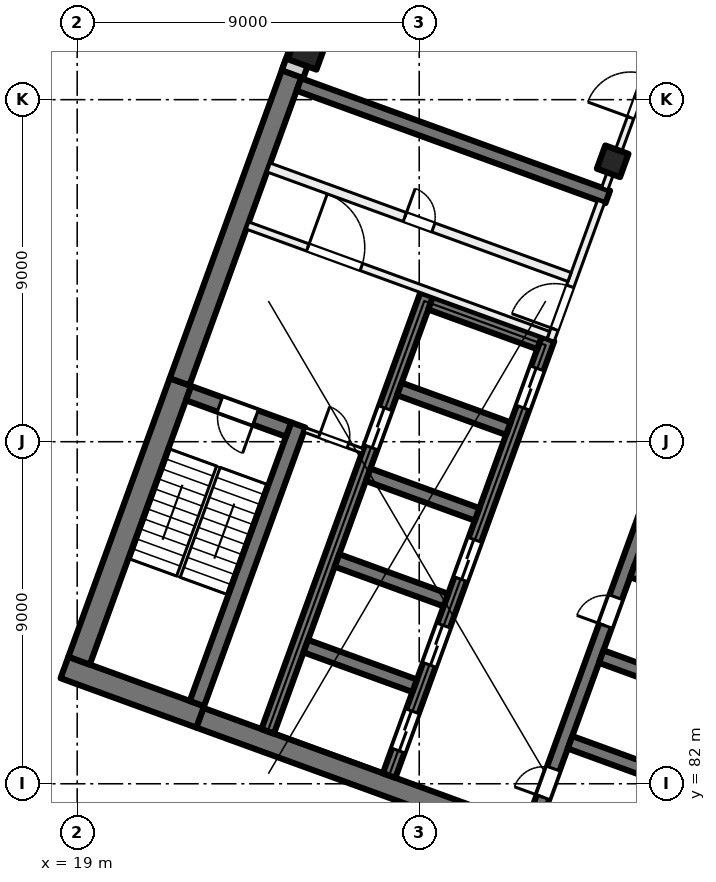
"""IFC4 building model, lengths in metres.
Left out: names, types, materials, properties, quantities, classifications, styles, units other than length and angle.
Written with IfcOpenShell. Run it as: python <this file> out.ifc"""

import sys

from ifc_helpers import new_model, si_unit, direction, frame, frame_2d, origin, origin_2d, place, context, subcontext, project, spatial, rectangle, extrude, element, fill, save


model = new_model("IFC4")
c1 = context("Model", 3, precision=1e-05, world=origin(), true_north=direction((0.0, 1.0)))
c2 = subcontext(c1, "Body", "Model", "MODEL_VIEW")
j1 = project(units=[si_unit("LENGTHUNIT", "METRE"), si_unit("PLANEANGLEUNIT", "RADIAN")], contexts=[c1])
p1 = place(None, origin())
s1 = spatial("IfcSite", under=j1, at=p1, CompositionType="ELEMENT")
p2 = place(p1, origin())
s2 = spatial("IfcBuilding", under=s1, at=p2, CompositionType="ELEMENT")
p3 = place(p2, frame((0.0, 0.0, 138.5)))
s3 = spatial("IfcBuildingStorey", under=s2, at=p3, CompositionType="ELEMENT", Elevation=138.5)
p4 = place(p3, frame((33.091, 98.379, 0.0), z_axis=(0.0, 0.0, 1.0), x_axis=(-0.342020143326, -0.939692620786, 0.0)))
e1 = element("IfcColumn", 1, at=p4, inside=s3, PredefinedType="COLUMN", context=c2, shape_type="SweptSolid", body=[
    extrude(rectangle(XDim=0.65, YDim=0.65, at=origin_2d()), origin(), (0.0, 0.0, 1.0), 4.0),
])
p5 = place(p3, frame((25.056, 101.303, 0.0), z_axis=(0.0, 0.0, 1.0), x_axis=(-0.342020143326, -0.939692620786, 0.0)))
e2 = element("IfcColumn", 2, at=p5, inside=s3, PredefinedType="COLUMN", context=c2, shape_type="SweptSolid", body=[
    extrude(rectangle(XDim=0.8, YDim=0.8, at=origin_2d()), origin(), (0.0, 0.0, 1.0), 4.0),
])
p6 = place(p3, frame((35.759, 78.811, 0.0), z_axis=(0.0, 0.0, 1.0), x_axis=(-0.939692894512, 0.342019391267, 0.0)))
e3 = element("IfcWall", 3, at=p6, inside=s3, PredefinedType="SHEAR", context=c2, shape_type="SweptSolid", body=[
    extrude(rectangle(XDim=14.4, YDim=0.55, at=frame_2d((7.2, 0.0))), origin(), (0.0, 0.0, 1.0), 4.0),
])
p7 = place(p3, frame((22.236, 83.76, 0.0), z_axis=(0.0, 0.0, 1.0), x_axis=(-0.939680822529, 0.342052557032, 0.0)))
e4 = element("IfcWall", 4, at=p7, inside=s3, PredefinedType="SHEAR", context=c2, shape_type="SweptSolid", body=[
    extrude(rectangle(XDim=3.8, YDim=0.6, at=frame_2d((1.9, 0.0))), origin(), (0.0, 0.0, 1.0), 4.0),
])
p8 = place(p3, frame((19.05, 85.239, 0.0), z_axis=(0.0, 0.0, 1.0), x_axis=(0.342016982193, 0.939693771338, 0.0)))
e5 = element("IfcWall", 5, at=p8, inside=s3, PredefinedType="SHEAR", context=c2, shape_type="SweptSolid", body=[
    extrude(rectangle(XDim=7.8, YDim=0.6, at=frame_2d((3.9, 0.0))), origin(), (0.0, 0.0, 1.0), 4.0),
])
p9 = place(p3, frame((21.694, 92.577, 0.0), z_axis=(0.0, 0.0, 1.0), x_axis=(0.342010253184, 0.939696220444, 0.0)))
e6 = element("IfcWall", 6, at=p9, inside=s3, PredefinedType="SHEAR", context=c2, shape_type="SweptSolid", body=[
    extrude(rectangle(XDim=8.95, YDim=0.55, at=frame_2d((4.475, 0.0))), origin(), (0.0, 0.0, 1.0), 4.0),
])
p10 = place(p3, frame((22.15, 84.11, 0.0), z_axis=(0.0, 0.0, 1.0), x_axis=(0.342016982193, 0.939693771338, 0.0)))
e7 = element("IfcWall", 7, at=p10, inside=s3, PredefinedType="SHEAR", context=c2, shape_type="SweptSolid", body=[
    extrude(rectangle(XDim=7.8, YDim=0.4, at=frame_2d((3.9, 0.0))), origin(), (0.0, 0.0, 1.0), 4.0),
])
p11 = place(p3, frame((24.562, 91.32, 0.0), z_axis=(0.0, 0.0, 1.0), x_axis=(-0.939717030584, 0.341953070509, 0.0)))
e8 = element("IfcWall", 8, at=p11, inside=s3, PredefinedType="SHEAR", context=c2, shape_type="SweptSolid", body=[
    extrude(rectangle(XDim=2.8, YDim=0.4, at=frame_2d((1.4, 0.0))), origin(), (0.0, 0.0, 1.0), 4.0),
])
p12 = place(p11, frame((0.925, 0.0, 0.0)))
e9 = element("IfcOpeningElement", 9, at=p12, cuts=e8, PredefinedType="OPENING", context=c2, shape_type="SweptSolid", body=[
    extrude(rectangle(XDim=1.0, YDim=2.1, at=frame_2d((0.5, 1.05))), frame((0.0, 0.21, 0.0), z_axis=(0.0, -1.0, 0.0), x_axis=(1.0, 0.0, 0.0)), (0.0, 0.0, 1.0), 0.42),
])
p13 = place(p3, frame((30.967, 80.848, 0.0), z_axis=(0.0, 0.0, 1.0), x_axis=(0.34201563943, 0.939694260058, 0.0)))
e10 = element("IfcWall", 10, at=p13, inside=s3, PredefinedType="SHEAR", context=c2, shape_type="SweptSolid", body=[
    extrude(rectangle(XDim=12.225, YDim=0.35, at=frame_2d((6.113, 0.0))), origin(), (0.0, 0.0, 1.0), 4.0),
])
p14 = place(p13, frame((0.85, 0.0, 0.0)))
e11 = element("IfcOpeningElement", 11, at=p14, cuts=e10, PredefinedType="OPENING", context=c2, shape_type="SweptSolid", body=[
    extrude(rectangle(XDim=0.8, YDim=2.1, at=frame_2d((0.4, 1.05))), frame((0.0, 0.185, 0.0), z_axis=(0.0, -1.0, 0.0), x_axis=(1.0, 0.0, 0.0)), (0.0, 0.0, 1.0), 0.37),
])
p15 = place(p13, frame((5.65, 0.0, 0.0)))
e12 = element("IfcOpeningElement", 12, at=p15, cuts=e10, PredefinedType="OPENING", context=c2, shape_type="SweptSolid", body=[
    extrude(rectangle(XDim=0.8, YDim=2.1, at=frame_2d((0.4, 1.05))), frame((0.0, 0.185, 0.0), z_axis=(0.0, -1.0, 0.0), x_axis=(1.0, 0.0, 0.0)), (0.0, 0.0, 1.0), 0.37),
])
p16 = place(p3, frame((34.835, 82.047, 0.0), z_axis=(0.0, 0.0, 1.0), x_axis=(-0.939683528043, 0.3420451244, 0.0)))
e13 = element("IfcWall", 13, at=p16, inside=s3, PredefinedType="SHEAR", context=c2, shape_type="SweptSolid", body=[
    extrude(rectangle(XDim=3.05, YDim=0.35, at=frame_2d((1.525, 0.0))), origin(), (0.0, 0.0, 1.0), 4.0),
])
p17 = place(p3, frame((35.656, 84.303, 0.0), z_axis=(0.0, 0.0, 1.0), x_axis=(-0.939709254651, 0.341974438698, 0.0)))
e14 = element("IfcWall", 14, at=p17, inside=s3, PredefinedType="SHEAR", context=c2, shape_type="SweptSolid", body=[
    extrude(rectangle(XDim=3.05, YDim=0.35, at=frame_2d((1.525, 0.0))), origin(), (0.0, 0.0, 1.0), 4.0),
])
p18 = place(p3, frame((36.477, 86.558, 0.0), z_axis=(0.0, 0.0, 1.0), x_axis=(-0.939683528043, 0.3420451244, 0.0)))
e15 = element("IfcWall", 15, at=p18, inside=s3, PredefinedType="SHEAR", context=c2, shape_type="SweptSolid", body=[
    extrude(rectangle(XDim=3.05, YDim=0.35, at=frame_2d((1.525, 0.0))), origin(), (0.0, 0.0, 1.0), 4.0),
])
p19 = place(p3, frame((27.208, 82.216, 0.0), z_axis=(0.0, 0.0, 1.0), x_axis=(0.34201563943, 0.939694260058, 0.0)))
e16 = element("IfcWall", 16, at=p19, inside=s3, PredefinedType="SHEAR", context=c2, shape_type="SweptSolid", body=[
    extrude(rectangle(XDim=12.225, YDim=0.35, at=frame_2d((6.113, 0.0))), origin(), (0.0, 0.0, 1.0), 4.0),
])
p20 = place(p19, frame((0.7, 0.0, 0.0)))
e17 = element("IfcOpeningElement", 17, at=p20, cuts=e16, PredefinedType="OPENING", context=c2, shape_type="SweptSolid", body=[
    extrude(rectangle(XDim=1.1, YDim=2.1, at=frame_2d((0.55, 1.05))), frame((0.0, 0.185, 0.0), z_axis=(0.0, -1.0, 0.0), x_axis=(1.0, 0.0, 0.0)), (0.0, 0.0, 1.0), 0.37),
])
p21 = place(p19, frame((3.1, 0.0, 0.0)))
e18 = element("IfcOpeningElement", 18, at=p21, cuts=e16, PredefinedType="OPENING", context=c2, shape_type="SweptSolid", body=[
    extrude(rectangle(XDim=1.1, YDim=2.1, at=frame_2d((0.55, 1.05))), frame((0.0, 0.185, 0.0), z_axis=(0.0, -1.0, 0.0), x_axis=(1.0, 0.0, 0.0)), (0.0, 0.0, 1.0), 0.37),
])
p22 = place(p19, frame((5.5, 0.0, 0.0)))
e19 = element("IfcOpeningElement", 19, at=p22, cuts=e16, PredefinedType="OPENING", context=c2, shape_type="SweptSolid", body=[
    extrude(rectangle(XDim=1.1, YDim=2.1, at=frame_2d((0.55, 1.05))), frame((0.0, 0.185, 0.0), z_axis=(0.0, -1.0, 0.0), x_axis=(1.0, 0.0, 0.0)), (0.0, 0.0, 1.0), 0.37),
])
p23 = place(p19, frame((10.3, 0.0, 0.0)))
e20 = element("IfcOpeningElement", 20, at=p23, cuts=e16, PredefinedType="OPENING", context=c2, shape_type="SweptSolid", body=[
    extrude(rectangle(XDim=1.1, YDim=2.1, at=frame_2d((0.55, 1.05))), frame((0.0, 0.185, 0.0), z_axis=(0.0, -1.0, 0.0), x_axis=(1.0, 0.0, 0.0)), (0.0, 0.0, 1.0), 0.37),
])
p24 = place(p3, frame((24.013, 83.379, 0.0), z_axis=(0.0, 0.0, 1.0), x_axis=(0.34201563943, 0.939694260058, 0.0)))
e21 = element("IfcWall", 21, at=p24, inside=s3, PredefinedType="SHEAR", context=c2, shape_type="SweptSolid", body=[
    extrude(rectangle(XDim=12.225, YDim=0.35, at=frame_2d((6.113, 0.0))), origin(), (0.0, 0.0, 1.0), 4.0),
])
p25 = place(p24, frame((7.95, 0.0, 0.0)))
e22 = element("IfcOpeningElement", 22, at=p25, cuts=e21, PredefinedType="OPENING", context=c2, shape_type="SweptSolid", body=[
    extrude(rectangle(XDim=1.1, YDim=2.1, at=frame_2d((0.55, 1.05))), frame((0.0, 0.185, 0.0), z_axis=(0.0, -1.0, 0.0), x_axis=(1.0, 0.0, 0.0)), (0.0, 0.0, 1.0), 0.37),
])
for number, where, z_axis, x_axis in (
    (23, (27.881, 84.578, 0.0), (0.0, 0.0, 1.0), (-0.94, 0.342, 0.0)),
    (24, (28.702, 86.833, 0.0), (0.0, 0.0, 1.0), (-0.94, 0.342, 0.0)),
    (25, (29.523, 89.089, 0.0), (0.0, 0.0, 1.0), (-0.94, 0.342, 0.0)),
):
    element("IfcWall", number, at=place(p3, frame(where, z_axis=z_axis, x_axis=x_axis)), inside=s3, PredefinedType="SHEAR", context=c2, shape_type="SweptSolid", body=[
        extrude(rectangle(XDim=3.05, YDim=0.35, at=frame_2d((1.525, 0.0))), origin(), (0.0, 0.0, 1.0), 4.0),
    ])
p26 = place(p3, frame((30.344, 91.344, 0.0), z_axis=(0.0, 0.0, 1.0), x_axis=(-0.939709254651, 0.341974438698, 0.0)))
e26 = element("IfcWall", 26, at=p26, inside=s3, PredefinedType="SHEAR", context=c2, shape_type="SweptSolid", body=[
    extrude(rectangle(XDim=3.05, YDim=0.35, at=frame_2d((1.525, 0.0))), origin(), (0.0, 0.0, 1.0), 4.0),
])
p27 = place(p3, frame((31.165, 93.599, 0.0), z_axis=(0.0, 0.0, 1.0), x_axis=(-0.939683528043, 0.3420451244, 0.0)))
e27 = element("IfcWall", 27, at=p27, inside=s3, PredefinedType="SHEAR", context=c2, shape_type="SweptSolid", body=[
    extrude(rectangle(XDim=3.05, YDim=0.35, at=frame_2d((1.525, 0.0))), origin(), (0.0, 0.0, 1.0), 4.0),
])
p28 = place(p3, frame((32.962, 97.441, 0.0), z_axis=(0.0, 0.0, 1.0), x_axis=(-0.939689545667, 0.342028592028, 0.0)))
e28 = element("IfcWall", 28, at=p28, inside=s3, PredefinedType="SHEAR", context=c2, shape_type="SweptSolid", body=[
    extrude(rectangle(XDim=8.65, YDim=0.35, at=frame_2d((4.325, 0.0))), origin(), (0.0, 0.0, 1.0), 4.0),
])
p29 = place(p3, frame((24.666, 100.669, 0.0), z_axis=(0.0, 0.0, 1.0), x_axis=(0.34201964167, 0.939692803373, 0.0)))
e29 = element("IfcWall", 29, at=p29, inside=s3, PredefinedType="SOLIDWALL", context=c2, shape_type="SweptSolid", body=[
    extrude(rectangle(XDim=32.884, YDim=0.6, at=frame_2d((16.442, 0.0))), origin(), (0.0, 0.0, 1.0), 3.625),
])
p30 = place(p29, frame((1.48, 0.0, 0.9)))
e30 = element("IfcOpeningElement", 30, at=p30, cuts=e29, PredefinedType="OPENING", context=c2, shape_type="SweptSolid", body=[
    extrude(rectangle(XDim=3.0, YDim=2.4, at=frame_2d((1.5, 1.2))), frame((0.0, 0.31, 0.0), z_axis=(0.0, -1.0, 0.0), x_axis=(1.0, 0.0, 0.0)), (0.0, 0.0, 1.0), 0.62),
])
p31 = place(p29, frame((5.98, 0.0, 0.9)))
e31 = element("IfcOpeningElement", 31, at=p31, cuts=e29, PredefinedType="OPENING", context=c2, shape_type="SweptSolid", body=[
    extrude(rectangle(XDim=3.0, YDim=2.4, at=frame_2d((1.5, 1.2))), frame((0.0, 0.31, 0.0), z_axis=(0.0, -1.0, 0.0), x_axis=(1.0, 0.0, 0.0)), (0.0, 0.0, 1.0), 0.62),
])
p32 = place(p29, frame((10.48, 0.0, 0.9)))
e32 = element("IfcOpeningElement", 32, at=p32, cuts=e29, PredefinedType="OPENING", context=c2, shape_type="SweptSolid", body=[
    extrude(rectangle(XDim=3.0, YDim=2.4, at=frame_2d((1.5, 1.2))), frame((0.0, 0.31, 0.0), z_axis=(0.0, -1.0, 0.0), x_axis=(1.0, 0.0, 0.0)), (0.0, 0.0, 1.0), 0.62),
])
p33 = place(p29, frame((14.98, 0.0, 0.9)))
e33 = element("IfcOpeningElement", 33, at=p33, cuts=e29, PredefinedType="OPENING", context=c2, shape_type="SweptSolid", body=[
    extrude(rectangle(XDim=3.0, YDim=2.4, at=frame_2d((1.5, 1.2))), frame((0.0, 0.31, 0.0), z_axis=(0.0, -1.0, 0.0), x_axis=(1.0, 0.0, 0.0)), (0.0, 0.0, 1.0), 0.62),
])
p34 = place(p29, frame((19.48, 0.0, 0.9)))
e34 = element("IfcOpeningElement", 34, at=p34, cuts=e29, PredefinedType="OPENING", context=c2, shape_type="SweptSolid", body=[
    extrude(rectangle(XDim=3.0, YDim=2.4, at=frame_2d((1.5, 1.2))), frame((0.0, 0.31, 0.0), z_axis=(0.0, -1.0, 0.0), x_axis=(1.0, 0.0, 0.0)), (0.0, 0.0, 1.0), 0.62),
])
p35 = place(p29, frame((23.98, 0.0, 0.9)))
e35 = element("IfcOpeningElement", 35, at=p35, cuts=e29, PredefinedType="OPENING", context=c2, shape_type="SweptSolid", body=[
    extrude(rectangle(XDim=3.0, YDim=2.4, at=frame_2d((1.5, 1.2))), frame((0.0, 0.31, 0.0), z_axis=(0.0, -1.0, 0.0), x_axis=(1.0, 0.0, 0.0)), (0.0, 0.0, 1.0), 0.62),
])
p36 = place(p29, frame((28.48, 0.0, 0.9)))
e36 = element("IfcOpeningElement", 36, at=p36, cuts=e29, PredefinedType="OPENING", context=c2, shape_type="SweptSolid", body=[
    extrude(rectangle(XDim=3.0, YDim=2.4, at=frame_2d((1.5, 1.2))), frame((0.0, 0.31, 0.0), z_axis=(0.0, -1.0, 0.0), x_axis=(1.0, 0.0, 0.0)), (0.0, 0.0, 1.0), 0.62),
])
p37 = place(p3, frame((31.459, 93.678, 0.0), z_axis=(0.0, 0.0, 1.0), x_axis=(0.341985870128, 0.939705094502, 0.0)))
e37 = element("IfcWall", 37, at=p37, inside=s3, PredefinedType="PARTITIONING", context=c2, shape_type="SweptSolid", body=[
    extrude(rectangle(XDim=3.875, YDim=0.2, at=frame_2d((1.938, 0.0))), origin(), (0.0, 0.0, 1.0), 3.625),
])
p38 = place(p37, frame((0.3, 0.0, 0.0)))
e38 = element("IfcOpeningElement", 38, at=p38, cuts=e37, PredefinedType="OPENING", context=c2, shape_type="SweptSolid", body=[
    extrude(rectangle(XDim=1.2, YDim=2.1, at=frame_2d((0.6, 1.05))), frame((0.0, 0.11, 0.0), z_axis=(0.0, -1.0, 0.0), x_axis=(1.0, 0.0, 0.0)), (0.0, 0.0, 1.0), 0.22),
])
p39 = place(p3, frame((23.483, 96.688, 0.0), z_axis=(0.0, 0.0, 1.0), x_axis=(0.939691007314, -0.342024576271, 0.0)))
e39 = element("IfcWall", 39, at=p39, inside=s3, PredefinedType="PARTITIONING", context=c2, shape_type="SweptSolid", body=[
    extrude(rectangle(XDim=8.425, YDim=0.2, at=frame_2d((4.212, 0.0))), origin(), (0.0, 0.0, 1.0), 3.625),
])
p40 = place(p39, frame((1.688, 0.0, 0.0)))
e40 = element("IfcOpeningElement", 40, at=p40, cuts=e39, PredefinedType="OPENING", context=c2, shape_type="SweptSolid", body=[
    extrude(rectangle(XDim=1.5, YDim=2.1, at=frame_2d((0.75, 1.05))), frame((0.0, 0.11, 0.0), z_axis=(0.0, -1.0, 0.0), x_axis=(1.0, 0.0, 0.0)), (0.0, 0.0, 1.0), 0.22),
])
p41 = place(p3, frame((24.039, 98.215, 0.0), z_axis=(0.0, 0.0, 1.0), x_axis=(0.939687617333, -0.342033889887, 0.0)))
e41 = element("IfcWall", 41, at=p41, inside=s3, PredefinedType="PARTITIONING", context=c2, shape_type="SweptSolid", body=[
    extrude(rectangle(XDim=8.425, YDim=0.25, at=frame_2d((4.212, 0.0))), origin(), (0.0, 0.0, 1.0), 3.625),
])
p42 = place(p41, frame((3.812, 0.0, 0.0)))
e42 = element("IfcOpeningElement", 42, at=p42, cuts=e41, PredefinedType="OPENING", context=c2, shape_type="SweptSolid", body=[
    extrude(rectangle(XDim=0.8, YDim=2.1, at=frame_2d((0.4, 1.05))), frame((0.0, 0.135, 0.0), z_axis=(0.0, -1.0, 0.0), x_axis=(1.0, 0.0, 0.0)), (0.0, 0.0, 1.0), 0.27),
])
p43 = place(p3, frame((24.985, 91.312, 0.0), z_axis=(0.0, 0.0, 1.0), x_axis=(0.939705651352, -0.341984340019, 0.0)))
e43 = element("IfcWall", 43, at=p43, inside=s3, PredefinedType="PARTITIONING", context=c2, shape_type="SweptSolid", body=[
    extrude(rectangle(XDim=1.625, YDim=0.125, at=frame_2d((0.812, 0.0))), origin(), (0.0, 0.0, 1.0), 3.625),
])
p44 = place(p43, frame((0.413, 0.0, 0.0)))
e44 = element("IfcOpeningElement", 44, at=p44, cuts=e43, PredefinedType="OPENING", context=c2, shape_type="SweptSolid", body=[
    extrude(rectangle(XDim=0.8, YDim=2.1, at=frame_2d((0.4, 1.05))), frame((0.0, 0.073, 0.0), z_axis=(0.0, -1.0, 0.0), x_axis=(1.0, 0.0, 0.0)), (0.0, 0.0, 1.0), 0.145),
])
p45 = place(p3, frame((32.881, 97.657, 0.0), z_axis=(0.0, 0.0, 1.0), x_axis=(0.342058204353, 0.939678766832, 0.0)))
e45 = element("IfcWall", 45, at=p45, inside=s3, PredefinedType="PARTITIONING", context=c2, shape_type="SweptSolid", body=[
    extrude(rectangle(XDim=5.163, YDim=0.175, at=frame_2d((2.581, 0.0))), origin(), (0.0, 0.0, 1.0), 3.625),
])
p46 = place(p45, frame((1.991, 0.0, 0.0)))
e46 = element("IfcOpeningElement", 46, at=p46, cuts=e45, PredefinedType="OPENING", context=c2, shape_type="SweptSolid", body=[
    extrude(rectangle(XDim=1.2, YDim=2.1, at=frame_2d((0.6, 1.05))), frame((0.0, 0.097, 0.0), z_axis=(0.0, -1.0, 0.0), x_axis=(1.0, 0.0, 0.0)), (0.0, 0.0, 1.0), 0.195),
])
p47 = place(p20, origin())
e47 = element("IfcDoor", 47, at=p47, inside=s3, OperationType="DOUBLE_DOOR_SLIDING", PredefinedType="DOOR", context=c2, shape_type="SweptSolid", body=[
    extrude(rectangle(XDim=1.1, YDim=2.1, at=frame_2d((0.55, 1.05))), frame((0.0, 0.025, 0.0), z_axis=(0.0, -1.0, 0.0), x_axis=(1.0, 0.0, 0.0)), (0.0, 0.0, 1.0), 0.05),
])
fill(e17, e47)
p48 = place(p21, origin())
e48 = element("IfcDoor", 48, at=p48, inside=s3, OperationType="DOUBLE_DOOR_SLIDING", PredefinedType="DOOR", context=c2, shape_type="SweptSolid", body=[
    extrude(rectangle(XDim=1.1, YDim=2.1, at=frame_2d((0.55, 1.05))), frame((0.0, 0.025, 0.0), z_axis=(0.0, -1.0, 0.0), x_axis=(1.0, 0.0, 0.0)), (0.0, 0.0, 1.0), 0.05),
])
fill(e18, e48)
p49 = place(p22, origin())
e49 = element("IfcDoor", 49, at=p49, inside=s3, OperationType="DOUBLE_DOOR_SLIDING", PredefinedType="DOOR", context=c2, shape_type="SweptSolid", body=[
    extrude(rectangle(XDim=1.1, YDim=2.1, at=frame_2d((0.55, 1.05))), frame((0.0, 0.025, 0.0), z_axis=(0.0, -1.0, 0.0), x_axis=(1.0, 0.0, 0.0)), (0.0, 0.0, 1.0), 0.05),
])
fill(e19, e49)
p50 = place(p23, origin())
e50 = element("IfcDoor", 50, at=p50, inside=s3, OperationType="DOUBLE_DOOR_SLIDING", PredefinedType="DOOR", context=c2, shape_type="SweptSolid", body=[
    extrude(rectangle(XDim=1.1, YDim=2.1, at=frame_2d((0.55, 1.05))), frame((0.0, 0.025, 0.0), z_axis=(0.0, -1.0, 0.0), x_axis=(1.0, 0.0, 0.0)), (0.0, 0.0, 1.0), 0.05),
])
fill(e20, e50)
p51 = place(p14, origin())
e51 = element("IfcDoor", 51, at=p51, inside=s3, OperationType="SINGLE_SWING_LEFT", PredefinedType="DOOR", context=c2, shape_type="SweptSolid", body=[
    extrude(rectangle(XDim=0.8, YDim=2.1, at=frame_2d((0.4, 1.05))), frame((0.0, 0.025, 0.0), z_axis=(0.0, -1.0, 0.0), x_axis=(1.0, 0.0, 0.0)), (0.0, 0.0, 1.0), 0.05),
])
fill(e11, e51)
p52 = place(p15, origin())
e52 = element("IfcDoor", 52, at=p52, inside=s3, OperationType="SINGLE_SWING_RIGHT", PredefinedType="DOOR", context=c2, shape_type="SweptSolid", body=[
    extrude(rectangle(XDim=0.8, YDim=2.1, at=frame_2d((0.4, 1.05))), frame((0.0, 0.025, 0.0), z_axis=(0.0, -1.0, 0.0), x_axis=(1.0, 0.0, 0.0)), (0.0, 0.0, 1.0), 0.05),
])
fill(e12, e52)
p53 = place(p38, origin())
e53 = element("IfcDoor", 53, at=p53, inside=s3, OperationType="DOUBLE_DOOR_SINGLE_SWING", PredefinedType="DOOR", context=c2, shape_type="SweptSolid", body=[
    extrude(rectangle(XDim=1.2, YDim=2.1, at=frame_2d((0.6, 1.05))), frame((0.0, 0.025, 0.0), z_axis=(0.0, -1.0, 0.0), x_axis=(1.0, 0.0, 0.0)), (0.0, 0.0, 1.0), 0.05),
])
fill(e38, e53)
p54 = place(p40, origin())
e54 = element("IfcDoor", 54, at=p54, inside=s3, OperationType="DOUBLE_DOOR_SINGLE_SWING", PredefinedType="DOOR", context=c2, shape_type="SweptSolid", body=[
    extrude(rectangle(XDim=1.5, YDim=2.1, at=frame_2d((0.75, 1.05))), frame((0.0, 0.025, 0.0), z_axis=(0.0, -1.0, 0.0), x_axis=(1.0, 0.0, 0.0)), (0.0, 0.0, 1.0), 0.05),
])
fill(e40, e54)
p55 = place(p12, origin())
e55 = element("IfcDoor", 55, at=p55, inside=s3, OperationType="SINGLE_SWING_LEFT", PredefinedType="DOOR", context=c2, shape_type="SweptSolid", body=[
    extrude(rectangle(XDim=1.0, YDim=2.1, at=frame_2d((0.5, 1.05))), frame((0.0, 0.025, 0.0), z_axis=(0.0, -1.0, 0.0), x_axis=(1.0, 0.0, 0.0)), (0.0, 0.0, 1.0), 0.05),
])
fill(e9, e55)
p56 = place(p44, origin())
e56 = element("IfcDoor", 56, at=p56, inside=s3, OperationType="SINGLE_SWING_RIGHT", PredefinedType="DOOR", context=c2, shape_type="SweptSolid", body=[
    extrude(rectangle(XDim=0.8, YDim=2.1, at=frame_2d((0.4, 1.05))), frame((0.0, 0.025, 0.0), z_axis=(0.0, -1.0, 0.0), x_axis=(1.0, 0.0, 0.0)), (0.0, 0.0, 1.0), 0.05),
])
fill(e44, e56)
p57 = place(p42, origin())
e57 = element("IfcDoor", 57, at=p57, inside=s3, OperationType="SINGLE_SWING_LEFT", PredefinedType="DOOR", context=c2, shape_type="SweptSolid", body=[
    extrude(rectangle(XDim=0.8, YDim=2.1, at=frame_2d((0.4, 1.05))), frame((0.0, 0.025, 0.0), z_axis=(0.0, -1.0, 0.0), x_axis=(1.0, 0.0, 0.0)), (0.0, 0.0, 1.0), 0.05),
])
fill(e42, e57)
p58 = place(p25, origin())
e58 = element("IfcDoor", 58, at=p58, inside=s3, OperationType="DOUBLE_DOOR_SLIDING", PredefinedType="DOOR", context=c2, shape_type="SweptSolid", body=[
    extrude(rectangle(XDim=1.1, YDim=2.1, at=frame_2d((0.55, 1.05))), frame((0.0, 0.025, 0.0), z_axis=(0.0, -1.0, 0.0), x_axis=(1.0, 0.0, 0.0)), (0.0, 0.0, 1.0), 0.05),
])
fill(e22, e58)
p59 = place(p46, origin())
e59 = element("IfcDoor", 59, at=p59, inside=s3, OperationType="DOUBLE_DOOR_SINGLE_SWING", PredefinedType="DOOR", context=c2, shape_type="SweptSolid", body=[
    extrude(rectangle(XDim=1.2, YDim=2.1, at=frame_2d((0.6, 1.05))), frame((0.0, 0.025, 0.0), z_axis=(0.0, -1.0, 0.0), x_axis=(1.0, 0.0, 0.0)), (0.0, 0.0, 1.0), 0.05),
])
fill(e46, e59)
save(model, sys.argv[1])
